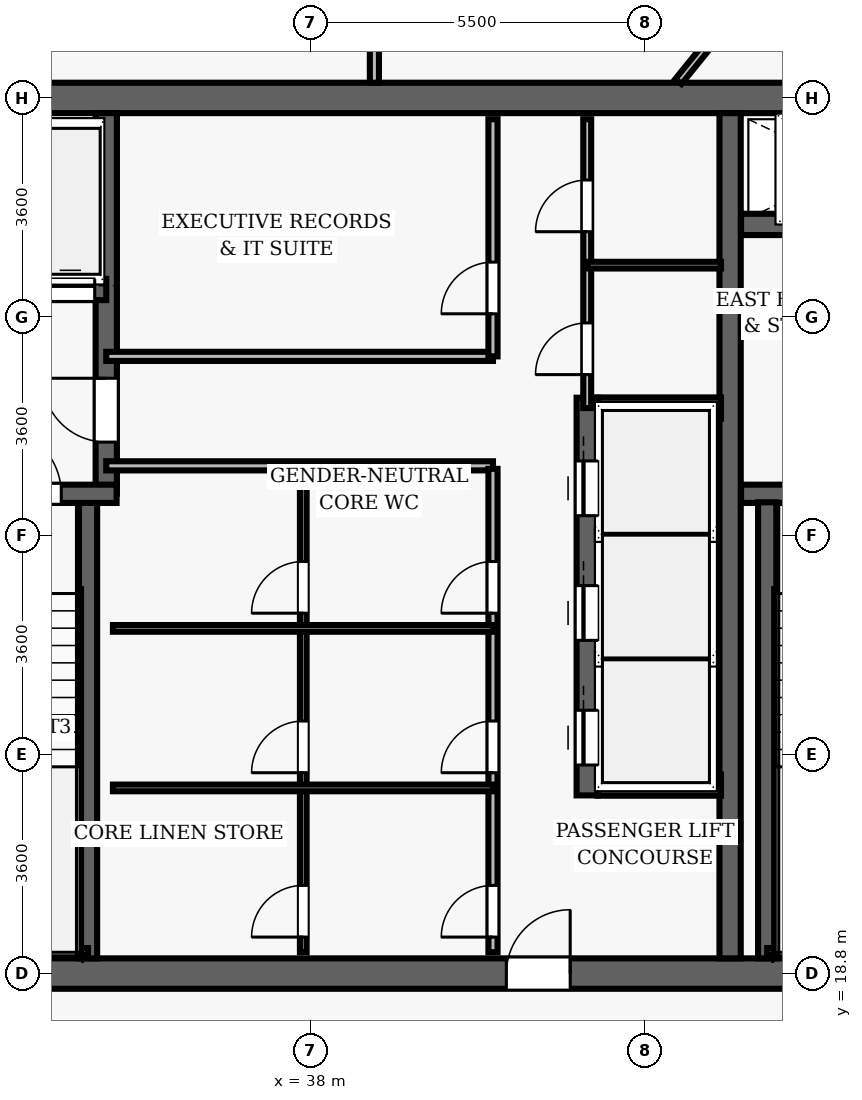
"""IFC4 building model, lengths in metres.
Left out: names, types, materials, properties, quantities, classifications, styles, units other than length and angle.
Written with IfcOpenShell. Run it as: python <this file> out.ifc"""

import sys

from ifc_helpers import new_model, si_unit, direction, frame, frame_2d, origin, place, context, subcontext, project, spatial, rectangle, extrude, element, fill, save


model = new_model("IFC4")
c1 = context("Model", 3, precision=1e-05, world=origin(), true_north=direction((0.0, 1.0)))
c2 = subcontext(c1, "Body", "Model", "MODEL_VIEW")
j1 = project(units=[si_unit("LENGTHUNIT", "METRE"), si_unit("PLANEANGLEUNIT", "RADIAN")], contexts=[c1])
p1 = place(None, origin())
s1 = spatial("IfcSite", under=j1, at=p1, CompositionType="ELEMENT")
p2 = place(p1, origin())
s2 = spatial("IfcBuilding", under=s1, at=p2, CompositionType="ELEMENT")
p3 = place(p2, frame((0.0, 0.0, 249.75)))
s3 = spatial("IfcBuildingStorey", under=s2, at=p3, CompositionType="ELEMENT", Elevation=249.75)
p4 = place(p3, frame((26.75, 18.8, 0.0), z_axis=(0.0, 0.0, 1.0), x_axis=(1.0, 0.0, 0.0)))
e1 = element("IfcWall", 1, at=p4, inside=s3, PredefinedType="SHEAR", context=c2, shape_type="SweptSolid", body=[
    extrude(rectangle(XDim=22.5, YDim=0.5, at=frame_2d((11.25, 0.0))), origin(), (0.0, 0.0, 1.0), 3.85),
])
p5 = place(p4, frame((14.47, 0.0, 0.0)))
e2 = element("IfcOpeningElement", 2, at=p5, cuts=e1, PredefinedType="OPENING", context=c2, shape_type="SweptSolid", body=[
    extrude(rectangle(XDim=1.05, YDim=2.15, at=frame_2d((0.525, 1.075))), frame((0.0, 0.26, 0.0), z_axis=(0.0, -1.0, 0.0), x_axis=(1.0, 0.0, 0.0)), (0.0, 0.0, 1.0), 0.52),
])
p6 = place(p3, frame((26.75, 33.2, 0.0), z_axis=(0.0, 0.0, 1.0), x_axis=(1.0, 0.0, 0.0)))
e3 = element("IfcWall", 3, at=p6, inside=s3, PredefinedType="SHEAR", context=c2, shape_type="SweptSolid", body=[
    extrude(rectangle(XDim=22.5, YDim=0.5, at=frame_2d((11.25, 0.0))), origin(), (0.0, 0.0, 1.0), 3.85),
])
p7 = place(p3, frame((44.9, 19.05, 0.0), z_axis=(0.0, 0.0, 1.0), x_axis=(0.0, 1.0, 0.0)))
e4 = element("IfcWall", 4, at=p7, inside=s3, PredefinedType="SHEAR", context=c2, shape_type="SweptSolid", body=[
    extrude(rectangle(XDim=13.9, YDim=0.35, at=frame_2d((6.95, 0.0))), origin(), (0.0, 0.0, 1.0), 3.85),
])
p8 = place(p3, frame((45.08, 26.69, 0.0), z_axis=(0.0, 0.0, 1.0), x_axis=(1.0, 0.0, 0.0)))
e5 = element("IfcWall", 5, at=p8, inside=s3, PredefinedType="SHEAR", context=c2, shape_type="SweptSolid", body=[
    extrude(rectangle(XDim=3.67, YDim=0.3, at=frame_2d((1.835, 0.0))), origin(), (0.0, 0.0, 1.0), 3.85),
])
p9 = place(p8, frame((1.05, 0.0, 0.0)))
e6 = element("IfcOpeningElement", 6, at=p9, cuts=e5, PredefinedType="OPENING", context=c2, shape_type="SweptSolid", body=[
    extrude(rectangle(XDim=1.1, YDim=2.15, at=frame_2d((0.55, 1.075))), frame((0.0, 0.16, 0.0), z_axis=(0.0, -1.0, 0.0), x_axis=(1.0, 0.0, 0.0)), (0.0, 0.0, 1.0), 0.32),
])
p10 = place(p3, frame((45.51, 19.05, 0.0), z_axis=(0.0, 0.0, 1.0), x_axis=(0.0, 1.0, 0.0)))
e7 = element("IfcWall", 7, at=p10, inside=s3, PredefinedType="SHEAR", context=c2, shape_type="SweptSolid", body=[
    extrude(rectangle(XDim=7.5, YDim=0.3, at=frame_2d((3.75, 0.0))), origin(), (0.0, 0.0, 1.0), 3.85),
])
p11 = place(p3, frame((45.51, 19.16, 0.0), z_axis=(0.0, 0.0, 1.0), x_axis=(1.0, 0.0, 0.0)))
e8 = element("IfcWall", 8, at=p11, inside=s3, PredefinedType="SHEAR", context=c2, shape_type="SweptSolid", body=[
    extrude(rectangle(XDim=3.095, YDim=0.12, at=frame_2d((1.547, 0.0))), origin(), (0.0, 0.0, 1.0), 3.85),
])
p12 = place(p3, frame((45.08, 31.12, 0.0), z_axis=(0.0, 0.0, 1.0), x_axis=(1.0, 0.0, 0.0)))
e9 = element("IfcWall", 9, at=p12, inside=s3, PredefinedType="SHEAR", context=c2, shape_type="SweptSolid", body=[
    extrude(rectangle(XDim=3.67, YDim=0.35, at=frame_2d((1.835, 0.0))), origin(), (0.0, 0.0, 1.0), 3.04),
])
p13 = place(p12, frame((1.25, 0.0, 0.0)))
e10 = element("IfcOpeningElement", 10, at=p13, cuts=e9, PredefinedType="OPENING", context=c2, shape_type="SweptSolid", body=[
    extrude(rectangle(XDim=1.1, YDim=2.15, at=frame_2d((0.55, 1.075))), frame((0.0, 0.185, 0.0), z_axis=(0.0, -1.0, 0.0), x_axis=(1.0, 0.0, 0.0)), (0.0, 0.0, 1.0), 0.37),
])
p14 = place(p3, frame((34.34, 19.05, 0.0), z_axis=(0.0, 0.0, 1.0), x_axis=(0.0, 1.0, 0.0)))
e11 = element("IfcWall", 11, at=p14, inside=s3, PredefinedType="SHEAR", context=c2, shape_type="SweptSolid", body=[
    extrude(rectangle(XDim=7.5, YDim=0.3, at=frame_2d((3.75, 0.0))), origin(), (0.0, 0.0, 1.0), 3.85),
])
p15 = place(p3, frame((34.64, 26.69, 0.0), z_axis=(0.0, 0.0, 1.0), x_axis=(0.0, 1.0, 0.0)))
e12 = element("IfcWall", 12, at=p15, inside=s3, PredefinedType="SHEAR", context=c2, shape_type="SweptSolid", body=[
    extrude(rectangle(XDim=6.26, YDim=0.35, at=frame_2d((3.13, 0.0))), origin(), (0.0, 0.0, 1.0), 3.85),
])
p16 = place(p15, frame((0.85, 0.0, 0.0)))
e13 = element("IfcOpeningElement", 13, at=p16, cuts=e12, PredefinedType="OPENING", context=c2, shape_type="SweptSolid", body=[
    extrude(rectangle(XDim=1.05, YDim=2.15, at=frame_2d((0.525, 1.075))), frame((0.0, 0.185, 0.0), z_axis=(0.0, -1.0, 0.0), x_axis=(1.0, 0.0, 0.0)), (0.0, 0.0, 1.0), 0.37),
])
p17 = place(p3, frame((31.25, 26.69, 0.0), z_axis=(0.0, 0.0, 1.0), x_axis=(1.0, 0.0, 0.0)))
e14 = element("IfcWall", 14, at=p17, inside=s3, PredefinedType="SHEAR", context=c2, shape_type="SweptSolid", body=[
    extrude(rectangle(XDim=3.56, YDim=0.3, at=frame_2d((1.78, 0.0))), origin(), (0.0, 0.0, 1.0), 3.85),
])
p18 = place(p17, frame((1.55, 0.0, 0.0)))
e15 = element("IfcOpeningElement", 15, at=p18, cuts=e14, PredefinedType="OPENING", context=c2, shape_type="SweptSolid", body=[
    extrude(rectangle(XDim=1.1, YDim=2.15, at=frame_2d((0.55, 1.075))), frame((0.0, 0.16, 0.0), z_axis=(0.0, -1.0, 0.0), x_axis=(1.0, 0.0, 0.0)), (0.0, 0.0, 1.0), 0.32),
])
p19 = place(p3, frame((31.3, 19.16, 0.0), z_axis=(0.0, 0.0, 1.0), x_axis=(1.0, 0.0, 0.0)))
e16 = element("IfcWall", 16, at=p19, inside=s3, PredefinedType="SHEAR", context=c2, shape_type="SweptSolid", body=[
    extrude(rectangle(XDim=3.04, YDim=0.12, at=frame_2d((1.52, 0.0))), origin(), (0.0, 0.0, 1.0), 3.85),
])
p20 = place(p3, frame((32.23, 30.05, 0.0), z_axis=(0.0, 0.0, 1.0), x_axis=(1.0, 0.0, 0.0)))
e17 = element("IfcWall", 17, at=p20, inside=s3, PredefinedType="SHEAR", context=c2, shape_type="SweptSolid", body=[
    extrude(rectangle(XDim=2.41, YDim=0.35, at=frame_2d((1.205, 0.0))), origin(), (0.0, 0.0, 1.0), 3.04),
])
p21 = place(p20, frame((0.42, 0.0, 0.0)))
e18 = element("IfcOpeningElement", 18, at=p21, cuts=e17, PredefinedType="OPENING", context=c2, shape_type="SweptSolid", body=[
    extrude(rectangle(XDim=0.8, YDim=2.15, at=frame_2d((0.4, 1.075))), frame((0.0, 0.185, 0.0), z_axis=(0.0, -1.0, 0.0), x_axis=(1.0, 0.0, 0.0)), (0.0, 0.0, 1.0), 0.37),
])
p22 = place(p20, frame((1.42, 0.0, 0.0)))
e19 = element("IfcOpeningElement", 19, at=p22, cuts=e17, PredefinedType="OPENING", context=c2, shape_type="SweptSolid", body=[
    extrude(rectangle(XDim=0.8, YDim=2.15, at=frame_2d((0.4, 1.075))), frame((0.0, 0.185, 0.0), z_axis=(0.0, -1.0, 0.0), x_axis=(1.0, 0.0, 0.0)), (0.0, 0.0, 1.0), 0.37),
])
p23 = place(p3, frame((42.55, 21.73, 0.0), z_axis=(0.0, 0.0, 1.0), x_axis=(0.0, 1.0, 0.0)))
e20 = element("IfcWall", 20, at=p23, inside=s3, PredefinedType="SHEAR", context=c2, shape_type="SweptSolid", body=[
    extrude(rectangle(XDim=6.54, YDim=0.35, at=frame_2d((3.27, 0.0))), origin(), (0.0, 0.0, 1.0), 3.04),
])
p24 = place(p23, frame((0.5, 0.0, 0.0)))
e21 = element("IfcOpeningElement", 21, at=p24, cuts=e20, PredefinedType="OPENING", context=c2, shape_type="SweptSolid", body=[
    extrude(rectangle(XDim=0.9, YDim=2.15, at=frame_2d((0.45, 1.075))), frame((0.0, 0.185, 0.0), z_axis=(0.0, -1.0, 0.0), x_axis=(1.0, 0.0, 0.0)), (0.0, 0.0, 1.0), 0.37),
])
p25 = place(p23, frame((2.55, 0.0, 0.0)))
e22 = element("IfcOpeningElement", 22, at=p25, cuts=e20, PredefinedType="OPENING", context=c2, shape_type="SweptSolid", body=[
    extrude(rectangle(XDim=0.9, YDim=2.15, at=frame_2d((0.45, 1.075))), frame((0.0, 0.185, 0.0), z_axis=(0.0, -1.0, 0.0), x_axis=(1.0, 0.0, 0.0)), (0.0, 0.0, 1.0), 0.37),
])
p26 = place(p23, frame((4.6, 0.0, 0.0)))
e23 = element("IfcOpeningElement", 23, at=p26, cuts=e20, PredefinedType="OPENING", context=c2, shape_type="SweptSolid", body=[
    extrude(rectangle(XDim=0.9, YDim=2.15, at=frame_2d((0.45, 1.075))), frame((0.0, 0.185, 0.0), z_axis=(0.0, -1.0, 0.0), x_axis=(1.0, 0.0, 0.0)), (0.0, 0.0, 1.0), 0.37),
])
for number, where, z_axis, x_axis in (
    (24, (42.72, 21.9, 0.0), (0.0, 0.0, 1.0), (1.0, 0.0, 0.0)),
    (25, (42.72, 28.1, 0.0), (0.0, 0.0, 1.0), (1.0, 0.0, 0.0)),
):
    element("IfcWall", number, at=place(p3, frame(where, z_axis=z_axis, x_axis=x_axis)), inside=s3, PredefinedType="SHEAR", context=c2, shape_type="SweptSolid", body=[
        extrude(rectangle(XDim=2.03, YDim=0.35, at=frame_2d((1.015, 0.0))), origin(), (0.0, 0.0, 1.0), 3.04),
    ])
for number, where, z_axis, x_axis in (
    (26, (34.64, 27.15, 0.0), (0.0, 0.0, 1.0), (1.0, 0.0, 0.0)),
    (27, (34.64, 28.95, 0.0), (0.0, 0.0, 1.0), (1.0, 0.0, 0.0)),
):
    element("IfcWall", number, at=place(p3, frame(where, z_axis=z_axis, x_axis=x_axis)), inside=s3, PredefinedType="PARTITIONING", context=c2, shape_type="SweptSolid", body=[
        extrude(rectangle(XDim=6.36, YDim=0.15, at=frame_2d((3.18, 0.0))), origin(), (0.0, 0.0, 1.0), 3.04),
    ])
p27 = place(p3, frame((41.0, 28.95, 0.0), z_axis=(0.0, 0.0, 1.0), x_axis=(0.0, 1.0, 0.0)))
e28 = element("IfcWall", 28, at=p27, inside=s3, PredefinedType="PARTITIONING", context=c2, shape_type="SweptSolid", body=[
    extrude(rectangle(XDim=3.9, YDim=0.15, at=frame_2d((1.95, 0.0))), origin(), (0.0, 0.0, 1.0), 3.04),
])
p28 = place(p27, frame((0.7, 0.0, 0.0)))
e29 = element("IfcOpeningElement", 29, at=p28, cuts=e28, PredefinedType="OPENING", context=c2, shape_type="SweptSolid", body=[
    extrude(rectangle(XDim=0.85, YDim=2.1, at=frame_2d((0.425, 1.05))), frame((0.0, 0.085, 0.0), z_axis=(0.0, -1.0, 0.0), x_axis=(1.0, 0.0, 0.0)), (0.0, 0.0, 1.0), 0.17),
])
p29 = place(p3, frame((41.0, 19.15, 0.0), z_axis=(0.0, 0.0, 1.0), x_axis=(0.0, 1.0, 0.0)))
e30 = element("IfcWall", 30, at=p29, inside=s3, PredefinedType="PARTITIONING", context=c2, shape_type="SweptSolid", body=[
    extrude(rectangle(XDim=7.95, YDim=0.15, at=frame_2d((3.975, 0.0))), origin(), (0.0, 0.0, 1.0), 3.04),
])
p30 = place(p29, frame((0.25, 0.0, 0.0)))
e31 = element("IfcOpeningElement", 31, at=p30, cuts=e30, PredefinedType="OPENING", context=c2, shape_type="SweptSolid", body=[
    extrude(rectangle(XDim=0.85, YDim=2.1, at=frame_2d((0.425, 1.05))), frame((0.0, 0.085, 0.0), z_axis=(0.0, -1.0, 0.0), x_axis=(1.0, 0.0, 0.0)), (0.0, 0.0, 1.0), 0.17),
])
p31 = place(p29, frame((2.953, 0.0, 0.0)))
e32 = element("IfcOpeningElement", 32, at=p31, cuts=e30, PredefinedType="OPENING", context=c2, shape_type="SweptSolid", body=[
    extrude(rectangle(XDim=0.85, YDim=2.1, at=frame_2d((0.425, 1.05))), frame((0.0, 0.085, 0.0), z_axis=(0.0, -1.0, 0.0), x_axis=(1.0, 0.0, 0.0)), (0.0, 0.0, 1.0), 0.17),
])
p32 = place(p29, frame((5.576, 0.0, 0.0)))
e33 = element("IfcOpeningElement", 33, at=p32, cuts=e30, PredefinedType="OPENING", context=c2, shape_type="SweptSolid", body=[
    extrude(rectangle(XDim=0.85, YDim=2.1, at=frame_2d((0.425, 1.05))), frame((0.0, 0.085, 0.0), z_axis=(0.0, -1.0, 0.0), x_axis=(1.0, 0.0, 0.0)), (0.0, 0.0, 1.0), 0.17),
])
p33 = place(p3, frame((37.88, 19.15, 0.0), z_axis=(0.0, 0.0, 1.0), x_axis=(0.0, 1.0, 0.0)))
e34 = element("IfcWall", 34, at=p33, inside=s3, PredefinedType="PARTITIONING", context=c2, shape_type="SweptSolid", body=[
    extrude(rectangle(XDim=7.95, YDim=0.11, at=frame_2d((3.975, 0.0))), origin(), (0.0, 0.0, 1.0), 3.04),
])
p34 = place(p33, frame((0.25, 0.0, 0.0)))
e35 = element("IfcOpeningElement", 35, at=p34, cuts=e34, PredefinedType="OPENING", context=c2, shape_type="SweptSolid", body=[
    extrude(rectangle(XDim=0.85, YDim=2.1, at=frame_2d((0.425, 1.05))), frame((0.0, 0.065, 0.0), z_axis=(0.0, -1.0, 0.0), x_axis=(1.0, 0.0, 0.0)), (0.0, 0.0, 1.0), 0.13),
])
p35 = place(p33, frame((2.953, 0.0, 0.0)))
e36 = element("IfcOpeningElement", 36, at=p35, cuts=e34, PredefinedType="OPENING", context=c2, shape_type="SweptSolid", body=[
    extrude(rectangle(XDim=0.85, YDim=2.1, at=frame_2d((0.425, 1.05))), frame((0.0, 0.065, 0.0), z_axis=(0.0, -1.0, 0.0), x_axis=(1.0, 0.0, 0.0)), (0.0, 0.0, 1.0), 0.13),
])
p36 = place(p33, frame((5.576, 0.0, 0.0)))
e37 = element("IfcOpeningElement", 37, at=p36, cuts=e34, PredefinedType="OPENING", context=c2, shape_type="SweptSolid", body=[
    extrude(rectangle(XDim=0.85, YDim=2.1, at=frame_2d((0.425, 1.05))), frame((0.0, 0.065, 0.0), z_axis=(0.0, -1.0, 0.0), x_axis=(1.0, 0.0, 0.0)), (0.0, 0.0, 1.0), 0.13),
])
for number, where, z_axis, x_axis in (
    (38, (34.75, 21.853, 0.0), (0.0, 0.0, 1.0), (1.0, 0.0, 0.0)),
    (39, (34.75, 24.477, 0.0), (0.0, 0.0, 1.0), (1.0, 0.0, 0.0)),
):
    element("IfcWall", number, at=place(p3, frame(where, z_axis=z_axis, x_axis=x_axis)), inside=s3, PredefinedType="PARTITIONING", context=c2, shape_type="SweptSolid", body=[
        extrude(rectangle(XDim=6.25, YDim=0.11, at=frame_2d((3.125, 0.0))), origin(), (0.0, 0.0, 1.0), 3.04),
    ])
p37 = place(p3, frame((42.55, 28.1, 0.0), z_axis=(0.0, 0.0, 1.0), x_axis=(0.0, 1.0, 0.0)))
e40 = element("IfcWall", 40, at=p37, inside=s3, PredefinedType="PARTITIONING", context=c2, shape_type="SweptSolid", body=[
    extrude(rectangle(XDim=4.75, YDim=0.13, at=frame_2d((2.375, 0.0))), origin(), (0.0, 0.0, 1.0), 3.04),
])
p38 = place(p37, frame((0.55, 0.0, 0.0)))
e41 = element("IfcOpeningElement", 41, at=p38, cuts=e40, PredefinedType="OPENING", context=c2, shape_type="SweptSolid", body=[
    extrude(rectangle(XDim=0.85, YDim=2.1, at=frame_2d((0.425, 1.05))), frame((0.0, 0.075, 0.0), z_axis=(0.0, -1.0, 0.0), x_axis=(1.0, 0.0, 0.0)), (0.0, 0.0, 1.0), 0.15),
])
p39 = place(p37, frame((2.9, 0.0, 0.0)))
e42 = element("IfcOpeningElement", 42, at=p39, cuts=e40, PredefinedType="OPENING", context=c2, shape_type="SweptSolid", body=[
    extrude(rectangle(XDim=0.85, YDim=2.1, at=frame_2d((0.425, 1.05))), frame((0.0, 0.075, 0.0), z_axis=(0.0, -1.0, 0.0), x_axis=(1.0, 0.0, 0.0)), (0.0, 0.0, 1.0), 0.15),
])
p40 = place(p3, frame((42.55, 30.45, 0.0), z_axis=(0.0, 0.0, 1.0), x_axis=(1.0, 0.0, 0.0)))
e43 = element("IfcWall", 43, at=p40, inside=s3, PredefinedType="PARTITIONING", context=c2, shape_type="SweptSolid", body=[
    extrude(rectangle(XDim=2.2, YDim=0.11, at=frame_2d((1.1, 0.0))), origin(), (0.0, 0.0, 1.0), 3.04),
])
p41 = place(p3, frame((39.05, 33.45, 0.0), z_axis=(0.0, 0.0, 1.0), x_axis=(0.0, 1.0, 0.0)))
e44 = element("IfcWall", 44, at=p41, inside=s3, PredefinedType="PARTITIONING", context=c2, shape_type="SweptSolid", body=[
    extrude(rectangle(XDim=6.95, YDim=0.15, at=frame_2d((3.475, 0.0))), origin(), (0.0, 0.0, 1.0), 3.04),
])
p42 = place(p41, frame((1.262, 0.0, 0.0)))
e45 = element("IfcOpeningElement", 45, at=p42, cuts=e44, PredefinedType="OPENING", context=c2, shape_type="SweptSolid", body=[
    extrude(rectangle(XDim=0.95, YDim=2.15, at=frame_2d((0.475, 1.075))), frame((0.0, 0.085, 0.0), z_axis=(0.0, -1.0, 0.0), x_axis=(1.0, 0.0, 0.0)), (0.0, 0.0, 1.0), 0.17),
])
p43 = place(p3, frame((44.049, 33.47, 0.0), z_axis=(0.0, 0.0, 1.0), x_axis=(0.629319722443, 0.777146502883, 0.0)))
e46 = element("IfcWall", 46, at=p43, inside=s3, PredefinedType="PARTITIONING", context=c2, shape_type="SweptSolid", body=[
    extrude(rectangle(XDim=7.803, YDim=0.13, at=frame_2d((3.902, 0.0))), origin(), (0.0, 0.0, 1.0), 3.04),
])
p44 = place(p18, origin())
e47 = element("IfcDoor", 47, at=p44, inside=s3, OperationType="SINGLE_SWING_LEFT", PredefinedType="DOOR", context=c2, shape_type="SweptSolid", body=[
    extrude(rectangle(XDim=1.1, YDim=2.15, at=frame_2d((0.55, 1.075))), frame((0.0, 0.025, 0.0), z_axis=(0.0, -1.0, 0.0), x_axis=(1.0, 0.0, 0.0)), (0.0, 0.0, 1.0), 0.05),
])
fill(e15, e47)
p45 = place(p5, origin())
e48 = element("IfcDoor", 48, at=p45, inside=s3, OperationType="SINGLE_SWING_RIGHT", PredefinedType="DOOR", context=c2, shape_type="SweptSolid", body=[
    extrude(rectangle(XDim=1.05, YDim=2.15, at=frame_2d((0.525, 1.075))), frame((0.0, 0.025, 0.0), z_axis=(0.0, -1.0, 0.0), x_axis=(1.0, 0.0, 0.0)), (0.0, 0.0, 1.0), 0.05),
])
fill(e2, e48)
p46 = place(p16, origin())
e49 = element("IfcDoor", 49, at=p46, inside=s3, OperationType="SINGLE_SWING_RIGHT", PredefinedType="DOOR", context=c2, shape_type="SweptSolid", body=[
    extrude(rectangle(XDim=1.05, YDim=2.15, at=frame_2d((0.525, 1.075))), frame((0.0, 0.025, 0.0), z_axis=(0.0, -1.0, 0.0), x_axis=(1.0, 0.0, 0.0)), (0.0, 0.0, 1.0), 0.05),
])
fill(e13, e49)
p47 = place(p28, origin())
e50 = element("IfcDoor", 50, at=p47, inside=s3, OperationType="SINGLE_SWING_LEFT", PredefinedType="DOOR", context=c2, shape_type="SweptSolid", body=[
    extrude(rectangle(XDim=0.85, YDim=2.1, at=frame_2d((0.425, 1.05))), frame((0.0, 0.025, 0.0), z_axis=(0.0, -1.0, 0.0), x_axis=(1.0, 0.0, 0.0)), (0.0, 0.0, 1.0), 0.05),
])
fill(e29, e50)
p48 = place(p30, origin())
e51 = element("IfcDoor", 51, at=p48, inside=s3, OperationType="SINGLE_SWING_LEFT", PredefinedType="DOOR", context=c2, shape_type="SweptSolid", body=[
    extrude(rectangle(XDim=0.85, YDim=2.1, at=frame_2d((0.425, 1.05))), frame((0.0, 0.025, 0.0), z_axis=(0.0, -1.0, 0.0), x_axis=(1.0, 0.0, 0.0)), (0.0, 0.0, 1.0), 0.05),
])
fill(e31, e51)
p49 = place(p34, origin())
e52 = element("IfcDoor", 52, at=p49, inside=s3, OperationType="SINGLE_SWING_LEFT", PredefinedType="DOOR", context=c2, shape_type="SweptSolid", body=[
    extrude(rectangle(XDim=0.85, YDim=2.1, at=frame_2d((0.425, 1.05))), frame((0.0, 0.025, 0.0), z_axis=(0.0, -1.0, 0.0), x_axis=(1.0, 0.0, 0.0)), (0.0, 0.0, 1.0), 0.05),
])
fill(e35, e52)
p50 = place(p31, origin())
e53 = element("IfcDoor", 53, at=p50, inside=s3, OperationType="SINGLE_SWING_LEFT", PredefinedType="DOOR", context=c2, shape_type="SweptSolid", body=[
    extrude(rectangle(XDim=0.85, YDim=2.1, at=frame_2d((0.425, 1.05))), frame((0.0, 0.025, 0.0), z_axis=(0.0, -1.0, 0.0), x_axis=(1.0, 0.0, 0.0)), (0.0, 0.0, 1.0), 0.05),
])
fill(e32, e53)
p51 = place(p35, origin())
e54 = element("IfcDoor", 54, at=p51, inside=s3, OperationType="SINGLE_SWING_LEFT", PredefinedType="DOOR", context=c2, shape_type="SweptSolid", body=[
    extrude(rectangle(XDim=0.85, YDim=2.1, at=frame_2d((0.425, 1.05))), frame((0.0, 0.025, 0.0), z_axis=(0.0, -1.0, 0.0), x_axis=(1.0, 0.0, 0.0)), (0.0, 0.0, 1.0), 0.05),
])
fill(e36, e54)
p52 = place(p32, origin())
e55 = element("IfcDoor", 55, at=p52, inside=s3, OperationType="SINGLE_SWING_LEFT", PredefinedType="DOOR", context=c2, shape_type="SweptSolid", body=[
    extrude(rectangle(XDim=0.85, YDim=2.1, at=frame_2d((0.425, 1.05))), frame((0.0, 0.025, 0.0), z_axis=(0.0, -1.0, 0.0), x_axis=(1.0, 0.0, 0.0)), (0.0, 0.0, 1.0), 0.05),
])
fill(e33, e55)
p53 = place(p36, origin())
e56 = element("IfcDoor", 56, at=p53, inside=s3, OperationType="SINGLE_SWING_LEFT", PredefinedType="DOOR", context=c2, shape_type="SweptSolid", body=[
    extrude(rectangle(XDim=0.85, YDim=2.1, at=frame_2d((0.425, 1.05))), frame((0.0, 0.025, 0.0), z_axis=(0.0, -1.0, 0.0), x_axis=(1.0, 0.0, 0.0)), (0.0, 0.0, 1.0), 0.05),
])
fill(e37, e56)
p54 = place(p38, origin())
e57 = element("IfcDoor", 57, at=p54, inside=s3, OperationType="SINGLE_SWING_LEFT", PredefinedType="DOOR", context=c2, shape_type="SweptSolid", body=[
    extrude(rectangle(XDim=0.85, YDim=2.1, at=frame_2d((0.425, 1.05))), frame((0.0, 0.025, 0.0), z_axis=(0.0, -1.0, 0.0), x_axis=(1.0, 0.0, 0.0)), (0.0, 0.0, 1.0), 0.05),
])
fill(e41, e57)
p55 = place(p39, origin())
e58 = element("IfcDoor", 58, at=p55, inside=s3, OperationType="SINGLE_SWING_LEFT", PredefinedType="DOOR", context=c2, shape_type="SweptSolid", body=[
    extrude(rectangle(XDim=0.85, YDim=2.1, at=frame_2d((0.425, 1.05))), frame((0.0, 0.025, 0.0), z_axis=(0.0, -1.0, 0.0), x_axis=(1.0, 0.0, 0.0)), (0.0, 0.0, 1.0), 0.05),
])
fill(e42, e58)
p56 = place(p24, origin())
e59 = element("IfcDoor", 59, at=p56, inside=s3, OperationType="SLIDING_TO_LEFT", PredefinedType="DOOR", context=c2, shape_type="SweptSolid", body=[
    extrude(rectangle(XDim=0.9, YDim=2.15, at=frame_2d((0.45, 1.075))), frame((0.0, 0.025, 0.0), z_axis=(0.0, -1.0, 0.0), x_axis=(1.0, 0.0, 0.0)), (0.0, 0.0, 1.0), 0.05),
])
fill(e21, e59)
p57 = place(p25, origin())
e60 = element("IfcDoor", 60, at=p57, inside=s3, OperationType="SLIDING_TO_LEFT", PredefinedType="DOOR", context=c2, shape_type="SweptSolid", body=[
    extrude(rectangle(XDim=0.9, YDim=2.15, at=frame_2d((0.45, 1.075))), frame((0.0, 0.025, 0.0), z_axis=(0.0, -1.0, 0.0), x_axis=(1.0, 0.0, 0.0)), (0.0, 0.0, 1.0), 0.05),
])
fill(e22, e60)
p58 = place(p26, origin())
e61 = element("IfcDoor", 61, at=p58, inside=s3, OperationType="SLIDING_TO_LEFT", PredefinedType="DOOR", context=c2, shape_type="SweptSolid", body=[
    extrude(rectangle(XDim=0.9, YDim=2.15, at=frame_2d((0.45, 1.075))), frame((0.0, 0.025, 0.0), z_axis=(0.0, -1.0, 0.0), x_axis=(1.0, 0.0, 0.0)), (0.0, 0.0, 1.0), 0.05),
])
fill(e23, e61)
p59 = place(p22, origin())
e62 = element("IfcDoor", 62, at=p59, inside=s3, OperationType="SLIDING_TO_LEFT", PredefinedType="DOOR", context=c2, shape_type="SweptSolid", body=[
    extrude(rectangle(XDim=0.8, YDim=2.15, at=frame_2d((0.4, 1.075))), frame((0.0, 0.025, 0.0), z_axis=(0.0, -1.0, 0.0), x_axis=(1.0, 0.0, 0.0)), (0.0, 0.0, 1.0), 0.05),
])
fill(e19, e62)
save(model, sys.argv[1])
